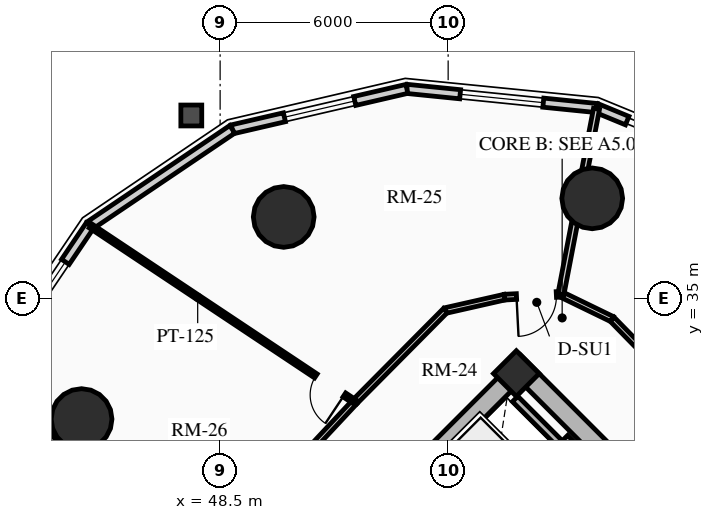
"""IFC4 building model, lengths in metres.
Left out: names, types, materials, properties, quantities, classifications, styles, units other than length and angle.
Written with IfcOpenShell. Run it as: python <this file> out.ifc"""

import sys

from ifc_helpers import new_model, si_unit, direction, frame, frame_2d, origin, origin_2d, place, context, subcontext, project, spatial, rectangle, circle, extrude, source, transform, mapped, element, fill, save


model = new_model("IFC4")
c1 = context("Model", 3, precision=1e-05, world=origin(), true_north=direction((0.0, 1.0)))
c2 = subcontext(c1, "Body", "Model", "MODEL_VIEW")
j1 = project(units=[si_unit("LENGTHUNIT", "METRE"), si_unit("PLANEANGLEUNIT", "RADIAN")], contexts=[c1])
p1 = place(None, origin())
s1 = spatial("IfcSite", under=j1, at=p1, CompositionType="ELEMENT")
p2 = place(p1, origin())
s2 = spatial("IfcBuilding", under=s1, at=p2, CompositionType="ELEMENT")
p3 = place(p2, frame((0.0, 0.0, 27.82)))
s3 = spatial("IfcBuildingStorey", under=s2, at=p3, CompositionType="ELEMENT", Elevation=27.82)
p4 = place(p3, frame((66.339, 23.227, 0.0), z_axis=(0.0, 0.0, 1.0), x_axis=(-0.707106781187, 0.707106781187, 0.0)))
e1 = element("IfcWall", 1, at=p4, inside=s3, PredefinedType="SHEAR", context=c2, shape_type="SweptSolid", body=[
    extrude(rectangle(XDim=14.3, YDim=0.5, at=frame_2d((7.15, 0.0))), origin(), (0.0, 0.0, 1.0), 2.91),
])
p5 = place(p3, frame((48.838, 25.596, 0.0), z_axis=(0.0, 0.0, 1.0), x_axis=(0.707106781187, 0.707106781187, 0.0)))
e2 = element("IfcWall", 2, at=p5, inside=s3, PredefinedType="SHEAR", context=c2, shape_type="SweptSolid", body=[
    extrude(rectangle(XDim=10.7, YDim=0.5, at=frame_2d((5.35, 0.0))), origin(), (0.0, 0.0, 1.0), 2.91),
])
m1 = source(origin(), c2, "Body", "SweptSolid", [
    extrude(rectangle(XDim=1.5, YDim=2.02, at=frame_2d((0.75, 1.01))), frame((0.0, 0.26, 0.0), z_axis=(0.0, -1.0, 0.0), x_axis=(1.0, 0.0, 0.0)), (0.0, 0.0, 1.0), 0.52),
])
p6 = place(p5, frame((4.6, 0.0, 0.0)))
e3 = element("IfcOpeningElement", 3, at=p6, cuts=e2, PredefinedType="OPENING", context=c2, shape_type="MappedRepresentation", body=[
    mapped(m1, transform((0.0, 0.0, 0.0), x_axis=(1.0, 0.0, 0.0), y_axis=(0.0, 1.0, 0.0), z_axis=(0.0, 0.0, 1.0), scale=1.0)),
])
p7 = place(p3, frame((56.294, 33.024, 0.0), z_axis=(0.0, 0.0, 1.0), x_axis=(0.707106781187, 0.707106781187, 0.0)))
e4 = element("IfcColumn", 4, at=p7, inside=s3, PredefinedType="COLUMN", context=c2, shape_type="SweptSolid", body=[
    extrude(rectangle(XDim=0.85, YDim=0.85, at=origin_2d()), origin(), (0.0, 0.0, 1.0), 2.91),
])
for number, where, z_axis, x_axis in (
    (5, (58.291, 37.635, 0.0), (0.0, 0.0, 1.0), (1.0, 0.0, 0.0)),
    (6, (50.173, 37.146, 0.0), (0.0, 0.0, 1.0), (1.0, 0.0, 0.0)),
    (7, (44.854, 31.827, 0.0), (0.0, 0.0, 1.0), (1.0, 0.0, 0.0)),
):
    element("IfcColumn", number, at=place(p3, frame(where, z_axis=z_axis, x_axis=x_axis)), inside=s3, PredefinedType="USERDEFINED", context=c2, shape_type="SweptSolid", body=[
        extrude(circle(Radius=0.8, at=origin_2d()), origin(), (0.0, 0.0, 1.0), 2.91),
    ])
p8 = place(p3, frame((58.407, 40.012, 0.0), z_axis=(0.0, 0.0, 1.0), x_axis=(0.924556017656, -0.381046152345, 0.0)))
e8 = element("IfcWall", 8, at=p8, inside=s3, PredefinedType="SOLIDWALL", context=c2, shape_type="SweptSolid", body=[
    extrude(rectangle(XDim=0.87, YDim=0.24, at=frame_2d((0.435, 0.0))), origin(), (0.0, 0.0, 1.0), 2.635),
])
p9 = place(p3, frame((53.414, 40.516, 0.0), z_axis=(0.0, 0.0, 1.0), x_axis=(0.994951574538, -0.100356187272, 0.0)))
e9 = element("IfcWall", 9, at=p9, inside=s3, PredefinedType="SOLIDWALL", context=c2, shape_type="SweptSolid", body=[
    extrude(rectangle(XDim=5.019, YDim=0.24, at=frame_2d((2.509, 0.0))), origin(), (0.0, 0.0, 1.0), 2.635),
])
m2 = source(origin(), c2, "Body", "SweptSolid", [
    extrude(rectangle(XDim=2.2, YDim=1.35, at=frame_2d((1.1, 0.675))), frame((0.0, 0.13, 0.0), z_axis=(0.0, -1.0, 0.0), x_axis=(1.0, 0.0, 0.0)), (0.0, 0.0, 1.0), 0.26),
])
p10 = place(p9, frame((1.409, 0.0, 0.65)))
e10 = element("IfcOpeningElement", 10, at=p10, cuts=e9, PredefinedType="OPENING", context=c2, shape_type="MappedRepresentation", body=[
    mapped(m2, transform((0.0, 0.0, 0.0), x_axis=(1.0, 0.0, 0.0), y_axis=(0.0, 1.0, 0.0), z_axis=(0.0, 0.0, 1.0), scale=1.0)),
])
p11 = place(p3, frame((48.82, 39.452, 0.0), z_axis=(0.0, 0.0, 1.0), x_axis=(0.974197104074, 0.225698919833, 0.0)))
e11 = element("IfcWall", 11, at=p11, inside=s3, PredefinedType="SOLIDWALL", context=c2, shape_type="SweptSolid", body=[
    extrude(rectangle(XDim=4.715, YDim=0.24, at=frame_2d((2.357, 0.0))), origin(), (0.0, 0.0, 1.0), 2.635),
])
m3 = source(origin(), c2, "Body", "SweptSolid", [
    extrude(rectangle(XDim=1.9, YDim=1.35, at=frame_2d((0.95, 0.675))), frame((0.0, 0.13, 0.0), z_axis=(0.0, -1.0, 0.0), x_axis=(1.0, 0.0, 0.0)), (0.0, 0.0, 1.0), 0.26),
])
p12 = place(p11, frame((1.408, 0.0, 0.65)))
e12 = element("IfcOpeningElement", 12, at=p12, cuts=e11, PredefinedType="OPENING", context=c2, shape_type="MappedRepresentation", body=[
    mapped(m3, transform((0.0, 0.0, 0.0), x_axis=(1.0, 0.0, 0.0), y_axis=(0.0, 1.0, 0.0), z_axis=(0.0, 0.0, 1.0), scale=1.0)),
])
p13 = place(p3, frame((45.076, 36.924, 0.0), z_axis=(0.0, 0.0, 1.0), x_axis=(0.828776615238, 0.559579594012, 0.0)))
e13 = element("IfcWall", 13, at=p13, inside=s3, PredefinedType="SOLIDWALL", context=c2, shape_type="SweptSolid", body=[
    extrude(rectangle(XDim=4.517, YDim=0.24, at=frame_2d((2.259, 0.0))), origin(), (0.0, 0.0, 1.0), 2.635),
])
p14 = place(p3, frame((42.548, 33.18, 0.0), z_axis=(0.0, 0.0, 1.0), x_axis=(0.559579594012, 0.828776615238, 0.0)))
e14 = element("IfcWall", 14, at=p14, inside=s3, PredefinedType="SOLIDWALL", context=c2, shape_type="SweptSolid", body=[
    extrude(rectangle(XDim=4.517, YDim=0.24, at=frame_2d((2.259, 0.0))), origin(), (0.0, 0.0, 1.0), 2.635),
])
p15 = place(p14, frame((1.159, 0.0, 0.65)))
e15 = element("IfcOpeningElement", 15, at=p15, cuts=e14, PredefinedType="OPENING", context=c2, shape_type="MappedRepresentation", body=[
    mapped(m2, transform((0.0, 0.0, 0.0), x_axis=(1.0, 0.0, 0.0), y_axis=(0.0, 1.0, 0.0), z_axis=(0.0, 0.0, 1.0), scale=1.0)),
])
p16 = place(p3, frame((55.615, 29.227, 0.0), z_axis=(0.0, 0.0, 1.0), x_axis=(0.707147878904, 0.70706568108, 0.0)))
e16 = element("IfcWall", 16, at=p16, inside=s3, PredefinedType="SHEAR", context=c2, shape_type="SweptSolid", body=[
    extrude(rectangle(XDim=2.97, YDim=0.2, at=frame_2d((1.485, 0.0))), origin(), (0.0, 0.0, 1.0), 2.91),
])
p17 = place(p3, frame((57.419, 31.2, 0.0), z_axis=(0.0, 0.0, 1.0), x_axis=(-0.707032117043, 0.707181437447, 0.0)))
e17 = element("IfcWall", 17, at=p17, inside=s3, PredefinedType="SHEAR", context=c2, shape_type="SweptSolid", body=[
    extrude(rectangle(XDim=1.635, YDim=0.2, at=frame_2d((0.817, 0.0))), origin(), (0.0, 0.0, 1.0), 2.91),
])
p18 = place(p3, frame((63.086, 30.086, 0.0), z_axis=(0.0, 0.0, 1.0), x_axis=(-0.699075897379, 0.715047473741, 0.0)))
e18 = element("IfcWall", 18, at=p18, inside=s3, PredefinedType="PARTITIONING", context=c2, shape_type="SweptSolid", body=[
    extrude(rectangle(XDim=6.114, YDim=0.15, at=frame_2d((3.057, 0.0))), origin(), (0.0, 0.0, 1.0), 2.159),
])
m4 = source(origin(), c2, "Body", "SweptSolid", [
    extrude(rectangle(XDim=1.05, YDim=2.015, at=frame_2d((0.525, 1.007))), frame((0.0, 0.085, 0.0), z_axis=(0.0, -1.0, 0.0), x_axis=(1.0, 0.0, 0.0)), (0.0, 0.0, 1.0), 0.17),
])
p19 = place(p18, frame((2.532, 0.0, 0.0)))
e19 = element("IfcOpeningElement", 19, at=p19, cuts=e18, PredefinedType="OPENING", context=c2, shape_type="MappedRepresentation", body=[
    mapped(m4, transform((0.0, 0.0, 0.0), x_axis=(1.0, 0.0, 0.0), y_axis=(0.0, 1.0, 0.0), z_axis=(0.0, 0.0, 1.0), scale=1.0)),
])
p20 = place(p3, frame((58.812, 34.458, 0.0), z_axis=(0.0, 0.0, 1.0), x_axis=(-0.899559490277, 0.436798264021, 0.0)))
e20 = element("IfcWall", 20, at=p20, inside=s3, PredefinedType="PARTITIONING", context=c2, shape_type="SweptSolid", body=[
    extrude(rectangle(XDim=1.495, YDim=0.15, at=frame_2d((0.748, 0.0))), origin(), (0.0, 0.0, 1.0), 2.205),
])
p21 = place(p3, frame((57.467, 35.111, 0.0), z_axis=(0.0, 0.0, 1.0), x_axis=(-0.998691757323, -0.051134859488, 0.0)))
e21 = element("IfcWall", 21, at=p21, inside=s3, PredefinedType="PARTITIONING", context=c2, shape_type="SweptSolid", body=[
    extrude(rectangle(XDim=1.485, YDim=0.15, at=frame_2d((0.742, 0.0))), origin(), (0.0, 0.0, 1.0), 2.159),
])
p22 = place(p21, frame((0.12, 0.0, 0.0)))
e22 = element("IfcOpeningElement", 22, at=p22, cuts=e21, PredefinedType="OPENING", context=c2, shape_type="MappedRepresentation", body=[
    mapped(m4, transform((0.0, 0.0, 0.0), x_axis=(1.0, 0.0, 0.0), y_axis=(0.0, 1.0, 0.0), z_axis=(0.0, 0.0, 1.0), scale=1.0)),
])
p23 = place(p3, frame((55.984, 35.035, 0.0), z_axis=(0.0, 0.0, 1.0), x_axis=(-0.975290305708, -0.22092718165, 0.0)))
e23 = element("IfcWall", 23, at=p23, inside=s3, PredefinedType="PARTITIONING", context=c2, shape_type="SweptSolid", body=[
    extrude(rectangle(XDim=1.597, YDim=0.15, at=frame_2d((0.798, 0.0))), origin(), (0.0, 0.0, 1.0), 2.205),
])
p24 = place(p3, frame((54.427, 34.683, 0.0), z_axis=(0.0, 0.0, 1.0), x_axis=(-0.704178989986, -0.710022499687, 0.0)))
e24 = element("IfcWall", 24, at=p24, inside=s3, PredefinedType="PARTITIONING", context=c2, shape_type="SweptSolid", body=[
    extrude(rectangle(XDim=3.384, YDim=0.15, at=frame_2d((1.692, 0.0))), origin(), (0.0, 0.0, 1.0), 2.159),
])
p25 = place(p3, frame((52.043, 32.28, 0.0), z_axis=(0.0, 0.0, 1.0), x_axis=(-0.682606081633, -0.730786519661, 0.0)))
e25 = element("IfcWall", 25, at=p25, inside=s3, PredefinedType="PARTITIONING", context=c2, shape_type="SweptSolid", body=[
    extrude(rectangle(XDim=6.527, YDim=0.15, at=frame_2d((3.263, 0.0))), origin(), (0.0, 0.0, 1.0), 2.159),
])
p26 = place(p3, frame((57.467, 35.111, 0.0), z_axis=(0.0, 0.0, 1.0), x_axis=(0.188572285328, 0.982059312468, 0.0)))
e26 = element("IfcWall", 26, at=p26, inside=s3, PredefinedType="PARTITIONING", context=c2, shape_type="SweptSolid", body=[
    extrude(rectangle(XDim=4.97, YDim=0.16, at=frame_2d((2.485, 0.0))), origin(), (0.0, 0.0, 1.0), 2.073),
])
p27 = place(p3, frame((47.588, 27.51, 0.0), z_axis=(0.0, 0.0, 1.0), x_axis=(-0.663646630644, 0.74804622159, 0.0)))
e27 = element("IfcWall", 27, at=p27, inside=s3, PredefinedType="MOVABLE", context=c2, shape_type="SweptSolid", body=[
    extrude(rectangle(XDim=7.567, YDim=0.1, at=frame_2d((3.784, 0.0))), origin(), (0.0, 0.0, 1.0), 2.073),
])
p28 = place(p3, frame((52.043, 32.28, 0.0), z_axis=(0.0, 0.0, 1.0), x_axis=(-0.832355916658, 0.554241488887, 0.0)))
e28 = element("IfcWall", 28, at=p28, inside=s3, PredefinedType="PARTITIONING", context=c2, shape_type="SweptSolid", body=[
    extrude(rectangle(XDim=8.354, YDim=0.125, at=frame_2d((4.177, 0.0))), origin(), (0.0, 0.0, 1.0), 2.073),
])
m5 = source(origin(), c2, "Body", "SweptSolid", [
    extrude(rectangle(XDim=0.9, YDim=2.005, at=frame_2d((0.45, 1.002))), frame((0.0, 0.073, 0.0), z_axis=(0.0, -1.0, 0.0), x_axis=(1.0, 0.0, 0.0)), (0.0, 0.0, 1.0), 0.145),
])
p29 = place(p28, frame((0.33, 0.0, 0.0)))
e29 = element("IfcOpeningElement", 29, at=p29, cuts=e28, PredefinedType="OPENING", context=c2, shape_type="MappedRepresentation", body=[
    mapped(m5, transform((0.0, 0.0, 0.0), x_axis=(1.0, 0.0, 0.0), y_axis=(0.0, 1.0, 0.0), z_axis=(0.0, 0.0, 1.0), scale=1.0)),
])
m6 = source(origin(), c2, "Body", "SweptSolid", [
    extrude(rectangle(XDim=2.2, YDim=1.35, at=frame_2d((1.1, 0.675))), frame((0.0, 0.03, 0.0), z_axis=(0.0, -1.0, 0.0), x_axis=(1.0, 0.0, 0.0)), (0.0, 0.0, 1.0), 0.06),
])
p30 = place(p10, origin())
e30 = element("IfcWindow", 30, at=p30, inside=s3, PartitioningType="DOUBLE_PANEL_VERTICAL", PredefinedType="WINDOW", context=c2, shape_type="MappedRepresentation", body=[
    mapped(m6, transform((0.0, 0.0, 0.0), x_axis=(1.0, 0.0, 0.0), y_axis=(0.0, 1.0, 0.0), z_axis=(0.0, 0.0, 1.0), scale=1.0)),
])
fill(e10, e30)
m7 = source(origin(), c2, "Body", "SweptSolid", [
    extrude(rectangle(XDim=1.9, YDim=1.35, at=frame_2d((0.95, 0.675))), frame((0.0, 0.03, 0.0), z_axis=(0.0, -1.0, 0.0), x_axis=(1.0, 0.0, 0.0)), (0.0, 0.0, 1.0), 0.06),
])
p31 = place(p12, origin())
e31 = element("IfcWindow", 31, at=p31, inside=s3, PartitioningType="DOUBLE_PANEL_VERTICAL", PredefinedType="WINDOW", context=c2, shape_type="MappedRepresentation", body=[
    mapped(m7, transform((0.0, 0.0, 0.0), x_axis=(1.0, 0.0, 0.0), y_axis=(0.0, 1.0, 0.0), z_axis=(0.0, 0.0, 1.0), scale=1.0)),
])
fill(e12, e31)
p32 = place(p15, origin())
e32 = element("IfcWindow", 32, at=p32, inside=s3, PartitioningType="DOUBLE_PANEL_VERTICAL", PredefinedType="WINDOW", context=c2, shape_type="MappedRepresentation", body=[
    mapped(m6, transform((0.0, 0.0, 0.0), x_axis=(1.0, 0.0, 0.0), y_axis=(0.0, 1.0, 0.0), z_axis=(0.0, 0.0, 1.0), scale=1.0)),
])
fill(e15, e32)
m8 = source(origin(), c2, "Body", "SweptSolid", [
    extrude(rectangle(XDim=1.05, YDim=2.015, at=frame_2d((0.525, 1.007))), frame((0.0, 0.025, 0.0), z_axis=(0.0, -1.0, 0.0), x_axis=(1.0, 0.0, 0.0)), (0.0, 0.0, 1.0), 0.05),
])
p33 = place(p22, origin())
e33 = element("IfcDoor", 33, at=p33, inside=s3, OperationType="SINGLE_SWING_RIGHT", PredefinedType="DOOR", context=c2, shape_type="MappedRepresentation", body=[
    mapped(m8, transform((0.0, 0.0, 0.0), x_axis=(1.0, 0.0, 0.0), y_axis=(0.0, 1.0, 0.0), z_axis=(0.0, 0.0, 1.0), scale=1.0)),
])
fill(e22, e33)
m9 = source(origin(), c2, "Body", "SweptSolid", [
    extrude(rectangle(XDim=0.9, YDim=2.005, at=frame_2d((0.45, 1.002))), frame((0.0, 0.025, 0.0), z_axis=(0.0, -1.0, 0.0), x_axis=(1.0, 0.0, 0.0)), (0.0, 0.0, 1.0), 0.05),
])
p34 = place(p29, origin())
e34 = element("IfcDoor", 34, at=p34, inside=s3, OperationType="SINGLE_SWING_LEFT", PredefinedType="DOOR", context=c2, shape_type="MappedRepresentation", body=[
    mapped(m9, transform((0.0, 0.0, 0.0), x_axis=(1.0, 0.0, 0.0), y_axis=(0.0, 1.0, 0.0), z_axis=(0.0, 0.0, 1.0), scale=1.0)),
])
fill(e29, e34)
save(model, sys.argv[1])
